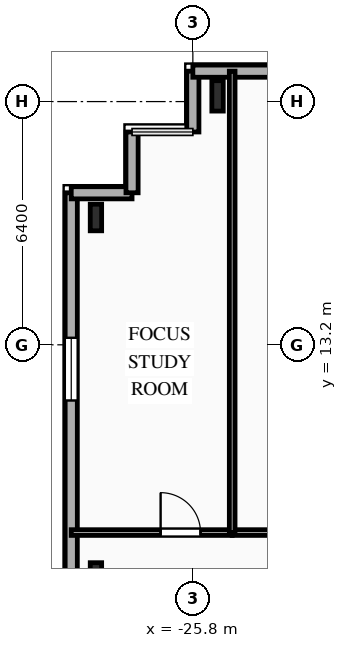
"""IFC4 building model, lengths in metres.
Left out: names, types, materials, properties, quantities, classifications, styles, units other than length and angle.
Written with IfcOpenShell. Run it as: python <this file> out.ifc"""

import sys

from ifc_helpers import new_model, si_unit, direction, frame, frame_2d, origin, origin_2d, place, context, subcontext, project, spatial, rectangle, i_section, extrude, element, fill, save


model = new_model("IFC4")
c1 = context("Model", 3, precision=1e-05, world=origin(), true_north=direction((0.0, 1.0)))
c2 = subcontext(c1, "Body", "Model", "MODEL_VIEW")
j1 = project(units=[si_unit("LENGTHUNIT", "METRE"), si_unit("PLANEANGLEUNIT", "RADIAN")], contexts=[c1])
p1 = place(None, origin())
s1 = spatial("IfcSite", under=j1, at=p1, CompositionType="ELEMENT")
p2 = place(p1, origin())
s2 = spatial("IfcBuilding", under=s1, at=p2, CompositionType="ELEMENT")
p3 = place(p2, frame((0.0, 0.0, 157.8)))
s3 = spatial("IfcBuildingStorey", under=s2, at=p3, CompositionType="ELEMENT", Elevation=157.8)
p4 = place(p3, frame((-25.15, 19.75, 0.0), z_axis=(0.0, 0.0, 1.0), x_axis=(1.0, 0.0, 0.0)))
e1 = element("IfcColumn", 1, at=p4, inside=s3, PredefinedType="COLUMN", context=c2, shape_type="SweptSolid", body=[
    extrude(i_section(OverallWidth=0.3, OverallDepth=0.8, WebThickness=0.018, FlangeThickness=0.033, FilletRadius=0.03, at=origin_2d()), origin(), (0.0, 0.0, 1.0), 3.35),
])
for number, where, z_axis, x_axis in (
    (2, (-28.35, 16.55, 0.0), (0.0, 0.0, 1.0), (1.0, 0.0, 0.0)),
    (3, (-28.35, 7.117, 0.0), (0.0, 0.0, 1.0), (1.0, 0.0, 0.0)),
):
    element("IfcColumn", number, at=place(p3, frame(where, z_axis=z_axis, x_axis=x_axis)), inside=s3, PredefinedType="COLUMN", context=c2, shape_type="SweptSolid", body=[
        extrude(i_section(OverallWidth=0.3, OverallDepth=0.7, WebThickness=0.017, FlangeThickness=0.032, FilletRadius=0.027, at=origin_2d()), origin(), (0.0, 0.0, 1.0), 3.35),
    ])
p5 = place(p3, frame((-29.0, -12.4, 0.0), z_axis=(0.0, 0.0, 1.0), x_axis=(0.0, 1.0, 0.0)))
e4 = element("IfcWall", 4, at=p5, inside=s3, PredefinedType="SOLIDWALL", context=c2, shape_type="SweptSolid", body=[
    extrude(rectangle(XDim=29.6, YDim=0.32, at=frame_2d((14.8, 0.0))), origin(), (0.0, 0.0, 1.0), 3.04),
])
p6 = place(p5, frame((3.895, 0.0, 0.85)))
e5 = element("IfcOpeningElement", 5, at=p6, cuts=e4, PredefinedType="OPENING", context=c2, shape_type="SweptSolid", body=[
    extrude(rectangle(XDim=1.65, YDim=1.85, at=frame_2d((0.825, 0.925))), frame((0.0, 0.17, 0.0), z_axis=(0.0, -1.0, 0.0), x_axis=(1.0, 0.0, 0.0)), (0.0, 0.0, 1.0), 0.34),
])
p7 = place(p5, frame((13.74, 0.0, 0.85)))
e6 = element("IfcOpeningElement", 6, at=p7, cuts=e4, PredefinedType="OPENING", context=c2, shape_type="SweptSolid", body=[
    extrude(rectangle(XDim=2.2, YDim=1.85, at=frame_2d((1.1, 0.925))), frame((0.0, 0.17, 0.0), z_axis=(0.0, -1.0, 0.0), x_axis=(1.0, 0.0, 0.0)), (0.0, 0.0, 1.0), 0.34),
])
p8 = place(p5, frame((24.135, 0.0, 0.85)))
e7 = element("IfcOpeningElement", 7, at=p8, cuts=e4, PredefinedType="OPENING", context=c2, shape_type="SweptSolid", body=[
    extrude(rectangle(XDim=1.65, YDim=1.85, at=frame_2d((0.825, 0.925))), frame((0.0, 0.17, 0.0), z_axis=(0.0, -1.0, 0.0), x_axis=(1.0, 0.0, 0.0)), (0.0, 0.0, 1.0), 0.34),
])
for number, where, z_axis, x_axis in (
    (8, (-29.0, 17.2, 0.0), (0.0, 0.0, 1.0), (1.0, 0.0, 0.0)),
    (9, (-27.4, 17.2, 0.0), (0.0, 0.0, 1.0), (0.0, 1.0, 0.0)),
):
    element("IfcWall", number, at=place(p3, frame(where, z_axis=z_axis, x_axis=x_axis)), inside=s3, PredefinedType="SOLIDWALL", context=c2, shape_type="SweptSolid", body=[
        extrude(rectangle(XDim=1.6, YDim=0.32, at=frame_2d((0.8, 0.0))), origin(), (0.0, 0.0, 1.0), 3.04),
    ])
p9 = place(p3, frame((-25.8, 18.8, 0.0), z_axis=(0.0, 0.0, 1.0), x_axis=(0.0, 1.0, 0.0)))
e10 = element("IfcWall", 10, at=p9, inside=s3, PredefinedType="SOLIDWALL", context=c2, shape_type="SweptSolid", body=[
    extrude(rectangle(XDim=1.6, YDim=0.32, at=frame_2d((0.8, 0.0))), origin(), (0.0, 0.0, 1.0), 3.04),
])
p10 = place(p3, frame((-25.8, 20.4, 0.0), z_axis=(0.0, 0.0, 1.0), x_axis=(1.0, 0.0, 0.0)))
e11 = element("IfcWall", 11, at=p10, inside=s3, PredefinedType="SOLIDWALL", context=c2, shape_type="SweptSolid", body=[
    extrude(rectangle(XDim=49.6, YDim=0.32, at=frame_2d((24.8, 0.0))), origin(), (0.0, 0.0, 1.0), 3.04),
])
p11 = place(p10, frame((2.135, 0.0, 0.85)))
e12 = element("IfcOpeningElement", 12, at=p11, cuts=e11, PredefinedType="OPENING", context=c2, shape_type="SweptSolid", body=[
    extrude(rectangle(XDim=1.65, YDim=1.85, at=frame_2d((0.825, 0.925))), frame((0.0, 0.17, 0.0), z_axis=(0.0, -1.0, 0.0), x_axis=(1.0, 0.0, 0.0)), (0.0, 0.0, 1.0), 0.34),
])
p12 = place(p10, frame((6.706, 0.0, 0.85)))
e13 = element("IfcOpeningElement", 13, at=p12, cuts=e11, PredefinedType="OPENING", context=c2, shape_type="SweptSolid", body=[
    extrude(rectangle(XDim=1.65, YDim=1.85, at=frame_2d((0.825, 0.925))), frame((0.0, 0.17, 0.0), z_axis=(0.0, -1.0, 0.0), x_axis=(1.0, 0.0, 0.0)), (0.0, 0.0, 1.0), 0.34),
])
p13 = place(p10, frame((14.966, 0.0, 0.85)))
e14 = element("IfcOpeningElement", 14, at=p13, cuts=e11, PredefinedType="OPENING", context=c2, shape_type="SweptSolid", body=[
    extrude(rectangle(XDim=1.5, YDim=1.85, at=frame_2d((0.75, 0.925))), frame((0.0, 0.17, 0.0), z_axis=(0.0, -1.0, 0.0), x_axis=(1.0, 0.0, 0.0)), (0.0, 0.0, 1.0), 0.34),
])
p14 = place(p10, frame((20.74, 0.0, 0.85)))
e15 = element("IfcOpeningElement", 15, at=p14, cuts=e11, PredefinedType="OPENING", context=c2, shape_type="SweptSolid", body=[
    extrude(rectangle(XDim=2.2, YDim=1.85, at=frame_2d((1.1, 0.925))), frame((0.0, 0.17, 0.0), z_axis=(0.0, -1.0, 0.0), x_axis=(1.0, 0.0, 0.0)), (0.0, 0.0, 1.0), 0.34),
])
p15 = place(p10, frame((27.74, 0.0, 0.85)))
e16 = element("IfcOpeningElement", 16, at=p15, cuts=e11, PredefinedType="OPENING", context=c2, shape_type="SweptSolid", body=[
    extrude(rectangle(XDim=2.2, YDim=1.85, at=frame_2d((1.1, 0.925))), frame((0.0, 0.17, 0.0), z_axis=(0.0, -1.0, 0.0), x_axis=(1.0, 0.0, 0.0)), (0.0, 0.0, 1.0), 0.34),
])
p16 = place(p10, frame((34.7, 0.0, 0.85)))
e17 = element("IfcOpeningElement", 17, at=p16, cuts=e11, PredefinedType="OPENING", context=c2, shape_type="SweptSolid", body=[
    extrude(rectangle(XDim=2.2, YDim=1.85, at=frame_2d((1.1, 0.925))), frame((0.0, 0.17, 0.0), z_axis=(0.0, -1.0, 0.0), x_axis=(1.0, 0.0, 0.0)), (0.0, 0.0, 1.0), 0.34),
])
p17 = place(p10, frame((42.215, 0.0, 0.85)))
e18 = element("IfcOpeningElement", 18, at=p17, cuts=e11, PredefinedType="OPENING", context=c2, shape_type="SweptSolid", body=[
    extrude(rectangle(XDim=1.65, YDim=1.85, at=frame_2d((0.825, 0.925))), frame((0.0, 0.17, 0.0), z_axis=(0.0, -1.0, 0.0), x_axis=(1.0, 0.0, 0.0)), (0.0, 0.0, 1.0), 0.34),
])
p18 = place(p10, frame((47.45, 0.0, 0.85)))
e19 = element("IfcOpeningElement", 19, at=p18, cuts=e11, PredefinedType="OPENING", context=c2, shape_type="SweptSolid", body=[
    extrude(rectangle(XDim=1.1, YDim=1.85, at=frame_2d((0.55, 0.925))), frame((0.0, 0.17, 0.0), z_axis=(0.0, -1.0, 0.0), x_axis=(1.0, 0.0, 0.0)), (0.0, 0.0, 1.0), 0.34),
])
p19 = place(p3, frame((-29.0, 8.26, 0.0), z_axis=(0.0, 0.0, 1.0), x_axis=(1.0, 0.0, 0.0)))
e20 = element("IfcWall", 20, at=p19, inside=s3, PredefinedType="PARTITIONING", context=c2, shape_type="SweptSolid", body=[
    extrude(rectangle(XDim=4.235, YDim=0.15, at=frame_2d((2.118, 0.0))), origin(), (0.0, 0.0, 1.0), 3.04),
])
p20 = place(p19, frame((2.352, 0.0, 0.0)))
e21 = element("IfcOpeningElement", 21, at=p20, cuts=e20, PredefinedType="OPENING", context=c2, shape_type="SweptSolid", body=[
    extrude(rectangle(XDim=1.05, YDim=2.15, at=frame_2d((0.525, 1.075))), frame((0.0, 0.085, 0.0), z_axis=(0.0, -1.0, 0.0), x_axis=(1.0, 0.0, 0.0)), (0.0, 0.0, 1.0), 0.17),
])
p21 = place(p3, frame((-24.765, 8.26, 0.0), z_axis=(0.0, 0.0, 1.0), x_axis=(1.0, 0.0, 0.0)))
e22 = element("IfcWall", 22, at=p21, inside=s3, PredefinedType="PARTITIONING", context=c2, shape_type="SweptSolid", body=[
    extrude(rectangle(XDim=3.815, YDim=0.15, at=frame_2d((1.907, 0.0))), origin(), (0.0, 0.0, 1.0), 3.04),
])
p22 = place(p3, frame((-24.765, 20.4, 0.0), z_axis=(0.0, 0.0, 1.0), x_axis=(0.0, -1.0, 0.0)))
e23 = element("IfcWall", 23, at=p22, inside=s3, PredefinedType="PARTITIONING", context=c2, shape_type="SweptSolid", body=[
    extrude(rectangle(XDim=12.14, YDim=0.15, at=frame_2d((6.07, 0.0))), origin(), (0.0, 0.0, 1.0), 3.04),
])
p23 = place(p8, origin())
e24 = element("IfcWindow", 24, at=p23, inside=s3, PartitioningType="SINGLE_PANEL", PredefinedType="WINDOW", context=c2, shape_type="SweptSolid", body=[
    extrude(rectangle(XDim=1.65, YDim=1.85, at=frame_2d((0.825, 0.925))), frame((0.0, 0.03, 0.0), z_axis=(0.0, -1.0, 0.0), x_axis=(1.0, 0.0, 0.0)), (0.0, 0.0, 1.0), 0.06),
])
fill(e7, e24)
p24 = place(p20, origin())
e25 = element("IfcDoor", 25, at=p24, inside=s3, OperationType="SINGLE_SWING_LEFT", PredefinedType="DOOR", context=c2, shape_type="SweptSolid", body=[
    extrude(rectangle(XDim=1.05, YDim=2.15, at=frame_2d((0.525, 1.075))), frame((0.0, 0.025, 0.0), z_axis=(0.0, -1.0, 0.0), x_axis=(1.0, 0.0, 0.0)), (0.0, 0.0, 1.0), 0.05),
])
fill(e21, e25)
save(model, sys.argv[1])
